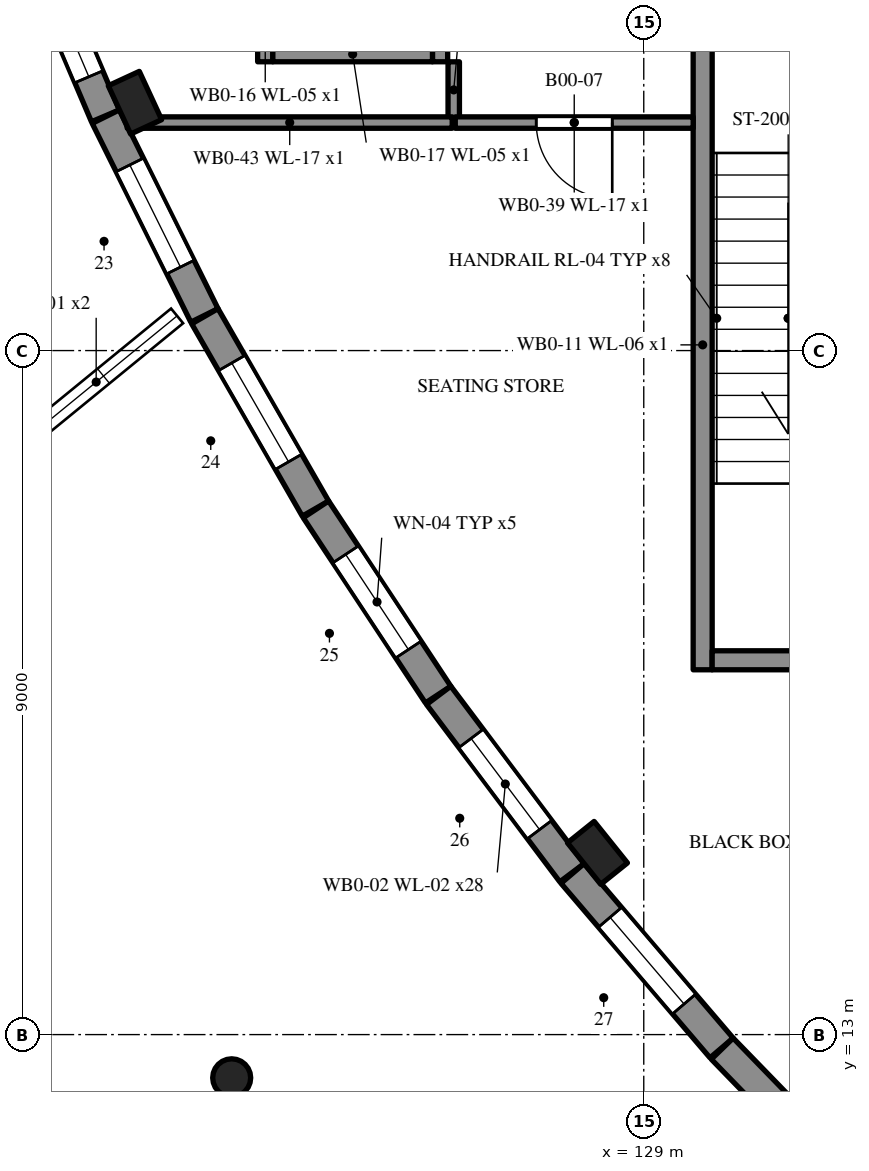
"""IFC4 building model, lengths in metres.
Left out: names, types, materials, properties, quantities, classifications, styles, units other than length and angle.
Written with IfcOpenShell. Run it as: python <this file> out.ifc"""

import sys

from ifc_helpers import new_model, si_unit, direction, frame, frame_2d, origin, origin_2d, place, context, subcontext, project, spatial, rectangle, circle, extrude, element, fill, save


model = new_model("IFC4")
c1 = context("Model", 3, precision=1e-05, world=origin(), true_north=direction((0.0, 1.0)))
c2 = subcontext(c1, "Body", "Model", "MODEL_VIEW")
j1 = project(units=[si_unit("LENGTHUNIT", "METRE"), si_unit("PLANEANGLEUNIT", "RADIAN")], contexts=[c1])
p1 = place(None, origin())
s1 = spatial("IfcSite", under=j1, at=p1, CompositionType="ELEMENT")
p2 = place(p1, origin())
s2 = spatial("IfcBuilding", under=s1, at=p2, CompositionType="ELEMENT")
p3 = place(p2, origin())
s3 = spatial("IfcBuildingStorey", under=s2, at=p3, CompositionType="ELEMENT", Elevation=0.0)
p4 = place(p3, frame((123.579, 12.431, -0.25), z_axis=(0.0, 0.0, 1.0), x_axis=(1.0, 0.0, 0.0)))
e1 = element("IfcColumn", 1, at=p4, inside=s3, PredefinedType="COLUMN", context=c2, shape_type="SweptSolid", body=[
    extrude(circle(Radius=0.25, at=origin_2d()), origin(), (0.0, 0.0, 1.0), 5.45),
])
p5 = place(p3, frame((120.893, 27.496, 0.0), z_axis=(0.0, 0.0, 1.0), x_axis=(0.391529943778, -0.920165367271, 0.0)))
e2 = element("IfcWall", 2, at=p5, inside=s3, PredefinedType="SOLIDWALL", context=c2, shape_type="SweptSolid", body=[
    extrude(rectangle(XDim=2.616, YDim=0.4, at=frame_2d((1.308, 0.0))), origin(), (0.0, 0.0, 1.0), 5.1),
])
p6 = place(p5, frame((0.558, 0.0, 0.9)))
e3 = element("IfcOpeningElement", 3, at=p6, cuts=e2, PredefinedType="OPENING", context=c2, shape_type="SweptSolid", body=[
    extrude(rectangle(XDim=1.5, YDim=2.1, at=frame_2d((0.75, 1.05))), frame((0.0, 0.21, 0.0), z_axis=(0.0, -1.0, 0.0), x_axis=(1.0, 0.0, 0.0)), (0.0, 0.0, 1.0), 0.42),
])
p7 = place(p3, frame((121.922, 25.078, 0.0), z_axis=(0.0, 0.0, 1.0), x_axis=(0.44433489597, -0.895860759395, 0.0)))
e4 = element("IfcWall", 4, at=p7, inside=s3, PredefinedType="SOLIDWALL", context=c2, shape_type="SweptSolid", body=[
    extrude(rectangle(XDim=2.92, YDim=0.4, at=frame_2d((1.46, 0.0))), origin(), (0.0, 0.0, 1.0), 5.1),
])
p8 = place(p7, frame((0.71, 0.0, 2.4)))
e5 = element("IfcOpeningElement", 5, at=p8, cuts=e4, PredefinedType="OPENING", context=c2, shape_type="SweptSolid", body=[
    extrude(rectangle(XDim=1.5, YDim=0.9, at=frame_2d((0.75, 0.45))), frame((0.0, 0.21, 0.0), z_axis=(0.0, -1.0, 0.0), x_axis=(1.0, 0.0, 0.0)), (0.0, 0.0, 1.0), 0.42),
])
p9 = place(p3, frame((123.226, 22.452, 0.0), z_axis=(0.0, 0.0, 1.0), x_axis=(0.498406705095, -0.866943340892, 0.0)))
e6 = element("IfcWall", 6, at=p9, inside=s3, PredefinedType="SOLIDWALL", context=c2, shape_type="SweptSolid", body=[
    extrude(rectangle(XDim=2.919, YDim=0.4, at=frame_2d((1.46, 0.0))), origin(), (0.0, 0.0, 1.0), 5.1),
])
p10 = place(p9, frame((0.71, 0.0, 2.4)))
e7 = element("IfcOpeningElement", 7, at=p10, cuts=e6, PredefinedType="OPENING", context=c2, shape_type="SweptSolid", body=[
    extrude(rectangle(XDim=1.5, YDim=0.9, at=frame_2d((0.75, 0.45))), frame((0.0, 0.21, 0.0), z_axis=(0.0, -1.0, 0.0), x_axis=(1.0, 0.0, 0.0)), (0.0, 0.0, 1.0), 0.42),
])
p11 = place(p3, frame((124.687, 19.911, 0.0), z_axis=(0.0, 0.0, 1.0), x_axis=(0.550602185206, -0.834767772285, 0.0)))
e8 = element("IfcWall", 8, at=p11, inside=s3, PredefinedType="SOLIDWALL", context=c2, shape_type="SweptSolid", body=[
    extrude(rectangle(XDim=2.919, YDim=0.4, at=frame_2d((1.46, 0.0))), origin(), (0.0, 0.0, 1.0), 5.1),
])
p12 = place(p11, frame((0.71, 0.0, 2.4)))
e9 = element("IfcOpeningElement", 9, at=p12, cuts=e8, PredefinedType="OPENING", context=c2, shape_type="SweptSolid", body=[
    extrude(rectangle(XDim=1.5, YDim=0.9, at=frame_2d((0.75, 0.45))), frame((0.0, 0.21, 0.0), z_axis=(0.0, -1.0, 0.0), x_axis=(1.0, 0.0, 0.0)), (0.0, 0.0, 1.0), 0.42),
])
p13 = place(p3, frame((126.302, 17.464, 0.0), z_axis=(0.0, 0.0, 1.0), x_axis=(0.600829330321, -0.799377330068, 0.0)))
e10 = element("IfcWall", 10, at=p13, inside=s3, PredefinedType="SOLIDWALL", context=c2, shape_type="SweptSolid", body=[
    extrude(rectangle(XDim=2.919, YDim=0.4, at=frame_2d((1.459, 0.0))), origin(), (0.0, 0.0, 1.0), 5.1),
])
p14 = place(p13, frame((0.71, 0.0, 2.4)))
e11 = element("IfcOpeningElement", 11, at=p14, cuts=e10, PredefinedType="OPENING", context=c2, shape_type="SweptSolid", body=[
    extrude(rectangle(XDim=1.5, YDim=0.9, at=frame_2d((0.75, 0.45))), frame((0.0, 0.21, 0.0), z_axis=(0.0, -1.0, 0.0), x_axis=(1.0, 0.0, 0.0)), (0.0, 0.0, 1.0), 0.42),
])
p15 = place(p3, frame((128.063, 15.12, 0.0), z_axis=(0.0, 0.0, 1.0), x_axis=(0.649458578854, -0.760396971557, 0.0)))
e12 = element("IfcWall", 12, at=p15, inside=s3, PredefinedType="SOLIDWALL", context=c2, shape_type="SweptSolid", body=[
    extrude(rectangle(XDim=3.019, YDim=0.4, at=frame_2d((1.51, 0.0))), origin(), (0.0, 0.0, 1.0), 5.1),
])
p16 = place(p15, frame((0.76, 0.0, 2.4)))
e13 = element("IfcOpeningElement", 13, at=p16, cuts=e12, PredefinedType="OPENING", context=c2, shape_type="SweptSolid", body=[
    extrude(rectangle(XDim=1.5, YDim=0.9, at=frame_2d((0.75, 0.45))), frame((0.0, 0.21, 0.0), z_axis=(0.0, -1.0, 0.0), x_axis=(1.0, 0.0, 0.0)), (0.0, 0.0, 1.0), 0.42),
])
p17 = place(p3, frame((130.032, 12.815, 0.0), z_axis=(0.0, 0.0, 1.0), x_axis=(0.696353968975, -0.71769850905, 0.0)))
e14 = element("IfcWall", 14, at=p17, inside=s3, PredefinedType="SOLIDWALL", context=c2, shape_type="SweptSolid", body=[
    extrude(rectangle(XDim=2.619, YDim=0.4, at=frame_2d((1.31, 0.0))), origin(), (0.0, 0.0, 1.0), 5.1),
])
for number, where, z_axis, x_axis in (
    (15, (128.391, 15.391, 0.0), (0.0, 0.0, 1.0), (0.626, -0.78, 0.0)),
    (16, (122.306, 25.261, 0.0), (0.0, 0.0, 1.0), (0.42, -0.908, 0.0)),
):
    element("IfcColumn", number, at=place(p3, frame(where, z_axis=z_axis, x_axis=x_axis)), inside=s3, PredefinedType="PILASTER", context=c2, shape_type="SweptSolid", body=[
        extrude(rectangle(XDim=0.7, YDim=0.45, at=origin_2d()), origin(), (0.0, 0.0, 1.0), 5.1),
    ])
p18 = place(p3, frame((129.775, 26.35, 0.0), z_axis=(0.0, 0.0, 1.0), x_axis=(0.0, -1.0, 0.0)))
e17 = element("IfcWall", 17, at=p18, inside=s3, PredefinedType="SHEAR", context=c2, shape_type="SweptSolid", body=[
    extrude(rectangle(XDim=8.55, YDim=0.25, at=frame_2d((4.275, 0.0))), origin(), (0.0, 0.0, 1.0), 5.4),
])
p19 = place(p3, frame((134.1, 17.925, 0.0), z_axis=(0.0, 0.0, 1.0), x_axis=(-1.0, 0.0, 0.0)))
e18 = element("IfcWall", 18, at=p19, inside=s3, PredefinedType="SHEAR", context=c2, shape_type="SweptSolid", body=[
    extrude(rectangle(XDim=4.2, YDim=0.25, at=frame_2d((2.1, 0.0))), origin(), (0.0, 0.0, 1.0), 5.4),
])
p20 = place(p19, frame((1.55, 0.0, 0.0)))
e19 = element("IfcOpeningElement", 19, at=p20, cuts=e18, PredefinedType="OPENING", context=c2, shape_type="SweptSolid", body=[
    extrude(rectangle(XDim=1.1, YDim=2.1, at=frame_2d((0.55, 1.05))), frame((0.0, 0.135, 0.0), z_axis=(0.0, -1.0, 0.0), x_axis=(1.0, 0.0, 0.0)), (0.0, 0.0, 1.0), 0.27),
])
p21 = place(p3, frame((126.32, 25.8, -1.2), z_axis=(0.0, 0.0, 1.0), x_axis=(0.0, 1.0, 0.0)))
e20 = element("IfcWall", 20, at=p21, inside=s3, PredefinedType="SHEAR", context=c2, shape_type="SweptSolid", body=[
    extrude(rectangle(XDim=2.0, YDim=0.2, at=frame_2d((1.0, 0.0))), origin(), (0.0, 0.0, 1.0), 6.3),
])
p22 = place(p21, frame((0.45, 0.0, 1.2)))
e21 = element("IfcOpeningElement", 21, at=p22, cuts=e20, PredefinedType="OPENING", context=c2, shape_type="SweptSolid", body=[
    extrude(rectangle(XDim=1.1, YDim=2.2, at=frame_2d((0.55, 1.1))), frame((0.0, 0.11, 0.0), z_axis=(0.0, -1.0, 0.0), x_axis=(1.0, 0.0, 0.0)), (0.0, 0.0, 1.0), 0.22),
])
p23 = place(p3, frame((124.02, 27.8, -1.2), z_axis=(0.0, 0.0, 1.0), x_axis=(0.0, -1.0, 0.0)))
e22 = element("IfcWall", 22, at=p23, inside=s3, PredefinedType="SHEAR", context=c2, shape_type="SweptSolid", body=[
    extrude(rectangle(XDim=2.0, YDim=0.2, at=frame_2d((1.0, 0.0))), origin(), (0.0, 0.0, 1.0), 6.3),
])
p24 = place(p3, frame((124.12, 25.9, -1.2), z_axis=(0.0, 0.0, 1.0), x_axis=(1.0, 0.0, 0.0)))
e23 = element("IfcWall", 23, at=p24, inside=s3, PredefinedType="SHEAR", context=c2, shape_type="SweptSolid", body=[
    extrude(rectangle(XDim=2.1, YDim=0.2, at=frame_2d((1.05, 0.0))), origin(), (0.0, 0.0, 1.0), 6.3),
])
p25 = place(p3, frame((126.5, 25.06, 0.0), z_axis=(0.0, 0.0, 1.0), x_axis=(0.0, 1.0, 0.0)))
e24 = element("IfcWall", 24, at=p25, inside=s3, PredefinedType="PARTITIONING", context=c2, shape_type="SweptSolid", body=[
    extrude(rectangle(XDim=0.74, YDim=0.15, at=frame_2d((0.37, 0.0))), origin(), (0.0, 0.0, 1.0), 5.1),
])
p26 = place(p3, frame((129.65, 25.0, 0.0), z_axis=(0.0, 0.0, 1.0), x_axis=(-1.0, 0.0, 0.0)))
e25 = element("IfcWall", 25, at=p26, inside=s3, PredefinedType="PARTITIONING", context=c2, shape_type="SweptSolid", body=[
    extrude(rectangle(XDim=3.13, YDim=0.15, at=frame_2d((1.565, 0.0))), origin(), (0.0, 0.0, 1.0), 5.1),
])
p27 = place(p26, frame((1.065, 0.0, 0.0)))
e26 = element("IfcOpeningElement", 26, at=p27, cuts=e25, PredefinedType="OPENING", context=c2, shape_type="SweptSolid", body=[
    extrude(rectangle(XDim=1.0, YDim=2.1, at=frame_2d((0.5, 1.05))), frame((0.0, 0.085, 0.0), z_axis=(0.0, -1.0, 0.0), x_axis=(1.0, 0.0, 0.0)), (0.0, 0.0, 1.0), 0.17),
])
p28 = place(p3, frame((126.48, 25.0, 0.0), z_axis=(0.0, 0.0, 1.0), x_axis=(-1.0, 0.0, 0.0)))
e27 = element("IfcWall", 27, at=p28, inside=s3, PredefinedType="PARTITIONING", context=c2, shape_type="SweptSolid", body=[
    extrude(rectangle(XDim=4.276, YDim=0.15, at=frame_2d((2.138, 0.0))), origin(), (0.0, 0.0, 1.0), 5.1),
])
p29 = place(p6, origin())
e28 = element("IfcWindow", 28, at=p29, inside=s3, PartitioningType="SINGLE_PANEL", PredefinedType="WINDOW", context=c2, shape_type="SweptSolid", body=[
    extrude(rectangle(XDim=1.5, YDim=2.1, at=frame_2d((0.75, 1.05))), frame((0.0, 0.03, 0.0), z_axis=(0.0, -1.0, 0.0), x_axis=(1.0, 0.0, 0.0)), (0.0, 0.0, 1.0), 0.06),
])
fill(e3, e28)
p30 = place(p8, origin())
e29 = element("IfcWindow", 29, at=p30, inside=s3, PartitioningType="SINGLE_PANEL", PredefinedType="WINDOW", context=c2, shape_type="SweptSolid", body=[
    extrude(rectangle(XDim=1.5, YDim=0.9, at=frame_2d((0.75, 0.45))), frame((0.0, 0.03, 0.0), z_axis=(0.0, -1.0, 0.0), x_axis=(1.0, 0.0, 0.0)), (0.0, 0.0, 1.0), 0.06),
])
fill(e5, e29)
p31 = place(p10, origin())
e30 = element("IfcWindow", 30, at=p31, inside=s3, PartitioningType="SINGLE_PANEL", PredefinedType="WINDOW", context=c2, shape_type="SweptSolid", body=[
    extrude(rectangle(XDim=1.5, YDim=0.9, at=frame_2d((0.75, 0.45))), frame((0.0, 0.03, 0.0), z_axis=(0.0, -1.0, 0.0), x_axis=(1.0, 0.0, 0.0)), (0.0, 0.0, 1.0), 0.06),
])
fill(e7, e30)
p32 = place(p12, origin())
e31 = element("IfcWindow", 31, at=p32, inside=s3, PartitioningType="SINGLE_PANEL", PredefinedType="WINDOW", context=c2, shape_type="SweptSolid", body=[
    extrude(rectangle(XDim=1.5, YDim=0.9, at=frame_2d((0.75, 0.45))), frame((0.0, 0.03, 0.0), z_axis=(0.0, -1.0, 0.0), x_axis=(1.0, 0.0, 0.0)), (0.0, 0.0, 1.0), 0.06),
])
fill(e9, e31)
p33 = place(p14, origin())
e32 = element("IfcWindow", 32, at=p33, inside=s3, PartitioningType="SINGLE_PANEL", PredefinedType="WINDOW", context=c2, shape_type="SweptSolid", body=[
    extrude(rectangle(XDim=1.5, YDim=0.9, at=frame_2d((0.75, 0.45))), frame((0.0, 0.03, 0.0), z_axis=(0.0, -1.0, 0.0), x_axis=(1.0, 0.0, 0.0)), (0.0, 0.0, 1.0), 0.06),
])
fill(e11, e32)
p34 = place(p16, origin())
e33 = element("IfcWindow", 33, at=p34, inside=s3, PartitioningType="SINGLE_PANEL", PredefinedType="WINDOW", context=c2, shape_type="SweptSolid", body=[
    extrude(rectangle(XDim=1.5, YDim=0.9, at=frame_2d((0.75, 0.45))), frame((0.0, 0.03, 0.0), z_axis=(0.0, -1.0, 0.0), x_axis=(1.0, 0.0, 0.0)), (0.0, 0.0, 1.0), 0.06),
])
fill(e13, e33)
p35 = place(p27, origin())
e34 = element("IfcDoor", 34, at=p35, inside=s3, OperationType="SINGLE_SWING_LEFT", PredefinedType="DOOR", context=c2, shape_type="SweptSolid", body=[
    extrude(rectangle(XDim=1.0, YDim=2.1, at=frame_2d((0.5, 1.05))), frame((0.0, 0.025, 0.0), z_axis=(0.0, -1.0, 0.0), x_axis=(1.0, 0.0, 0.0)), (0.0, 0.0, 1.0), 0.05),
])
fill(e26, e34)
save(model, sys.argv[1])
